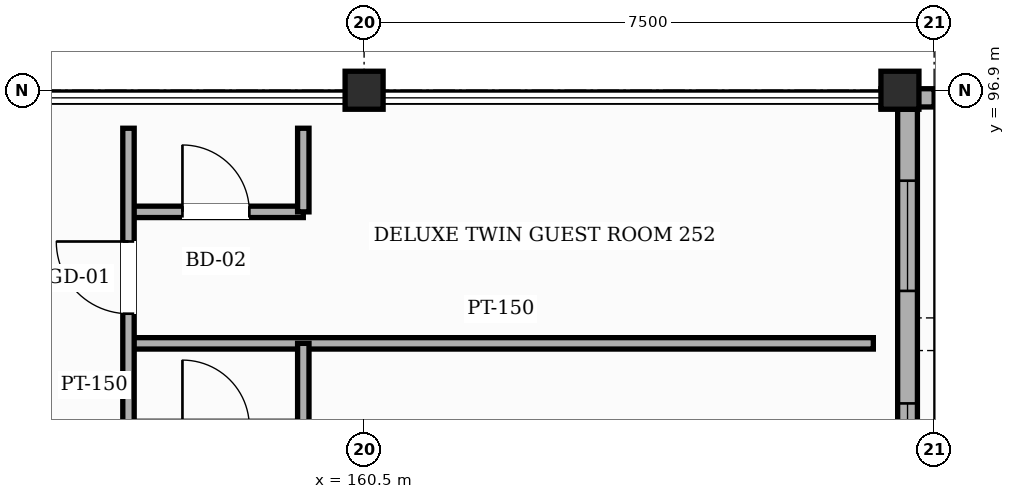
"""IFC4 building model, lengths in metres.
Left out: names, types, materials, properties, quantities, classifications, styles, units other than length and angle.
Written with IfcOpenShell. Run it as: python <this file> out.ifc"""

import sys

from ifc_helpers import new_model, si_unit, direction, frame, frame_2d, origin, origin_2d, place, context, subcontext, project, spatial, rectangle, hollow_rectangle, extrude, element, fill, save


model = new_model("IFC4")
c1 = context("Model", 3, precision=1e-05, world=origin(), true_north=direction((0.0, 1.0)))
c2 = subcontext(c1, "Body", "Model", "MODEL_VIEW")
j1 = project(units=[si_unit("LENGTHUNIT", "METRE"), si_unit("PLANEANGLEUNIT", "RADIAN")], contexts=[c1])
p1 = place(None, origin())
s1 = spatial("IfcSite", under=j1, at=p1, CompositionType="ELEMENT")
p2 = place(p1, origin())
s2 = spatial("IfcBuilding", under=s1, at=p2, CompositionType="ELEMENT")
p3 = place(p2, frame((0.0, 0.0, 35.4)))
s3 = spatial("IfcBuildingStorey", under=s2, at=p3, CompositionType="ELEMENT", Elevation=35.4)
for number, where, z_axis, x_axis in (
    (1, (160.5, 96.9, 0.0), (0.0, 0.0, 1.0), (1.0, 0.0, 0.0)),
    (2, (167.55, 96.9, 0.0), (0.0, 0.0, 1.0), (1.0, 0.0, 0.0)),
):
    element("IfcColumn", number, at=place(p3, frame(where, z_axis=z_axis, x_axis=x_axis)), inside=s3, PredefinedType="COLUMN", context=c2, shape_type="SweptSolid", body=[
        extrude(hollow_rectangle(XDim=0.5, YDim=0.5, WallThickness=0.022, InnerFilletRadius=0.022, OuterFilletRadius=0.044, at=origin_2d()), origin(), (0.0, 0.0, 1.0), 3.6),
    ])
p4 = place(p3, frame((167.65, 96.65, 0.0), z_axis=(0.0, 0.0, 1.0), x_axis=(0.0, -1.0, 0.0)))
e3 = element("IfcWall", 3, at=p4, inside=s3, PredefinedType="SOLIDWALL", context=c2, shape_type="SweptSolid", body=[
    extrude(rectangle(XDim=7.5, YDim=0.26, at=frame_2d((3.75, 0.0))), origin(), (0.0, 0.0, 1.0), 2.755),
])
p5 = place(p4, frame((6.28, 0.0, 0.85)))
e4 = element("IfcOpeningElement", 4, at=p5, cuts=e3, PredefinedType="OPENING", context=c2, shape_type="SweptSolid", body=[
    extrude(rectangle(XDim=0.85, YDim=1.35, at=frame_2d((0.425, 0.675))), frame((0.0, 0.14, 0.0), z_axis=(0.0, -1.0, 0.0), x_axis=(1.0, 0.0, 0.0)), (0.0, 0.0, 1.0), 0.28),
])
p6 = place(p4, frame((3.87, 0.0, 0.85)))
e5 = element("IfcOpeningElement", 5, at=p6, cuts=e3, PredefinedType="OPENING", context=c2, shape_type="SweptSolid", body=[
    extrude(rectangle(XDim=1.25, YDim=1.5, at=frame_2d((0.625, 0.75))), frame((0.0, 0.14, 0.0), z_axis=(0.0, -1.0, 0.0), x_axis=(1.0, 0.0, 0.0)), (0.0, 0.0, 1.0), 0.28),
])
p7 = place(p4, frame((0.94, 0.0, 0.85)))
e6 = element("IfcOpeningElement", 6, at=p7, cuts=e3, PredefinedType="OPENING", context=c2, shape_type="SweptSolid", body=[
    extrude(rectangle(XDim=1.45, YDim=1.5, at=frame_2d((0.725, 0.75))), frame((0.0, 0.14, 0.0), z_axis=(0.0, -1.0, 0.0), x_axis=(1.0, 0.0, 0.0)), (0.0, 0.0, 1.0), 0.28),
])
p8 = place(p3, frame((167.3, 96.8, 0.0), z_axis=(0.0, 0.0, 1.0), x_axis=(1.0, 0.0, 0.0)))
e7 = element("IfcWall", 7, at=p8, inside=s3, PredefinedType="SOLIDWALL", context=c2, shape_type="SweptSolid", body=[
    extrude(rectangle(XDim=0.7, YDim=0.24, at=frame_2d((0.35, 0.0))), origin(), (0.0, 0.0, 1.0), 3.365),
])
p9 = place(p3, frame((157.4, 93.57, 0.0), z_axis=(0.0, 0.0, 1.0), x_axis=(1.0, 0.0, 0.0)))
e8 = element("IfcWall", 8, at=p9, inside=s3, PredefinedType="PARTITIONING", context=c2, shape_type="SweptSolid", body=[
    extrude(rectangle(XDim=9.8, YDim=0.15, at=frame_2d((4.9, 0.0))), origin(), (0.0, 0.0, 1.0), 3.365),
])
p10 = place(p3, frame((157.4, 95.3, 0.0), z_axis=(0.0, 0.0, 1.0), x_axis=(1.0, 0.0, 0.0)))
e9 = element("IfcWall", 9, at=p10, inside=s3, PredefinedType="PARTITIONING", context=c2, shape_type="SweptSolid", body=[
    extrude(rectangle(XDim=2.3, YDim=0.15, at=frame_2d((1.15, 0.0))), origin(), (0.0, 0.0, 1.0), 3.365),
])
p11 = place(p10, frame((0.71, 0.0, 0.0)))
e10 = element("IfcOpeningElement", 10, at=p11, cuts=e9, PredefinedType="OPENING", context=c2, shape_type="SweptSolid", body=[
    extrude(rectangle(XDim=0.88, YDim=2.12, at=frame_2d((0.44, 1.06))), frame((0.0, 0.085, 0.0), z_axis=(0.0, -1.0, 0.0), x_axis=(1.0, 0.0, 0.0)), (0.0, 0.0, 1.0), 0.17),
])
p12 = place(p3, frame((157.4, 76.6, 0.0), z_axis=(0.0, 0.0, 1.0), x_axis=(0.0, 1.0, 0.0)))
e11 = element("IfcWall", 11, at=p12, inside=s3, PredefinedType="PARTITIONING", context=c2, shape_type="SweptSolid", body=[
    extrude(rectangle(XDim=19.8, YDim=0.15, at=frame_2d((9.9, 0.0))), origin(), (0.0, 0.0, 1.0), 3.365),
])
p13 = place(p12, frame((0.315, 0.0, 0.0)))
e12 = element("IfcOpeningElement", 12, at=p13, cuts=e11, PredefinedType="OPENING", context=c2, shape_type="SweptSolid", body=[
    extrude(rectangle(XDim=1.1, YDim=2.2, at=frame_2d((0.55, 1.1))), frame((0.0, 0.085, 0.0), z_axis=(0.0, -1.0, 0.0), x_axis=(1.0, 0.0, 0.0)), (0.0, 0.0, 1.0), 0.17),
])
p14 = place(p12, frame((3.22, 0.0, 0.0)))
e13 = element("IfcOpeningElement", 13, at=p14, cuts=e11, PredefinedType="OPENING", context=c2, shape_type="SweptSolid", body=[
    extrude(rectangle(XDim=0.95, YDim=2.15, at=frame_2d((0.475, 1.075))), frame((0.0, 0.085, 0.0), z_axis=(0.0, -1.0, 0.0), x_axis=(1.0, 0.0, 0.0)), (0.0, 0.0, 1.0), 0.17),
])
p15 = place(p12, frame((6.045, 0.0, 0.0)))
e14 = element("IfcOpeningElement", 14, at=p15, cuts=e11, PredefinedType="OPENING", context=c2, shape_type="SweptSolid", body=[
    extrude(rectangle(XDim=0.95, YDim=2.15, at=frame_2d((0.475, 1.075))), frame((0.0, 0.085, 0.0), z_axis=(0.0, -1.0, 0.0), x_axis=(1.0, 0.0, 0.0)), (0.0, 0.0, 1.0), 0.17),
])
p16 = place(p12, frame((8.875, 0.0, 0.0)))
e15 = element("IfcOpeningElement", 15, at=p16, cuts=e11, PredefinedType="OPENING", context=c2, shape_type="SweptSolid", body=[
    extrude(rectangle(XDim=0.95, YDim=2.15, at=frame_2d((0.475, 1.075))), frame((0.0, 0.085, 0.0), z_axis=(0.0, -1.0, 0.0), x_axis=(1.0, 0.0, 0.0)), (0.0, 0.0, 1.0), 0.17),
])
p17 = place(p12, frame((11.705, 0.0, 0.0)))
e16 = element("IfcOpeningElement", 16, at=p17, cuts=e11, PredefinedType="OPENING", context=c2, shape_type="SweptSolid", body=[
    extrude(rectangle(XDim=0.95, YDim=2.15, at=frame_2d((0.475, 1.075))), frame((0.0, 0.085, 0.0), z_axis=(0.0, -1.0, 0.0), x_axis=(1.0, 0.0, 0.0)), (0.0, 0.0, 1.0), 0.17),
])
p18 = place(p12, frame((14.53, 0.0, 0.0)))
e17 = element("IfcOpeningElement", 17, at=p18, cuts=e11, PredefinedType="OPENING", context=c2, shape_type="SweptSolid", body=[
    extrude(rectangle(XDim=0.95, YDim=2.15, at=frame_2d((0.475, 1.075))), frame((0.0, 0.085, 0.0), z_axis=(0.0, -1.0, 0.0), x_axis=(1.0, 0.0, 0.0)), (0.0, 0.0, 1.0), 0.17),
])
p19 = place(p12, frame((17.36, 0.0, 0.0)))
e18 = element("IfcOpeningElement", 18, at=p19, cuts=e11, PredefinedType="OPENING", context=c2, shape_type="SweptSolid", body=[
    extrude(rectangle(XDim=0.95, YDim=2.15, at=frame_2d((0.475, 1.075))), frame((0.0, 0.085, 0.0), z_axis=(0.0, -1.0, 0.0), x_axis=(1.0, 0.0, 0.0)), (0.0, 0.0, 1.0), 0.17),
])
p20 = place(p3, frame((159.7, 92.47, 0.0), z_axis=(0.0, 0.0, 1.0), x_axis=(0.0, 1.0, 0.0)))
e19 = element("IfcWall", 19, at=p20, inside=s3, PredefinedType="PARTITIONING", context=c2, shape_type="SweptSolid", body=[
    extrude(rectangle(XDim=1.1, YDim=0.15, at=frame_2d((0.55, 0.0))), origin(), (0.0, 0.0, 1.0), 3.365),
])
p21 = place(p3, frame((159.7, 95.3, 0.0), z_axis=(0.0, 0.0, 1.0), x_axis=(0.0, 1.0, 0.0)))
e20 = element("IfcWall", 20, at=p21, inside=s3, PredefinedType="PARTITIONING", context=c2, shape_type="SweptSolid", body=[
    extrude(rectangle(XDim=1.1, YDim=0.15, at=frame_2d((0.55, 0.0))), origin(), (0.0, 0.0, 1.0), 3.365),
])
p22 = place(p6, origin())
e21 = element("IfcWindow", 21, at=p22, inside=s3, PartitioningType="SINGLE_PANEL", PredefinedType="WINDOW", context=c2, shape_type="SweptSolid", body=[
    extrude(rectangle(XDim=1.25, YDim=1.5, at=frame_2d((0.625, 0.75))), frame((0.0, 0.03, 0.0), z_axis=(0.0, -1.0, 0.0), x_axis=(1.0, 0.0, 0.0)), (0.0, 0.0, 1.0), 0.06),
])
fill(e5, e21)
p23 = place(p7, origin())
e22 = element("IfcWindow", 22, at=p23, inside=s3, PartitioningType="SINGLE_PANEL", PredefinedType="WINDOW", context=c2, shape_type="SweptSolid", body=[
    extrude(rectangle(XDim=1.45, YDim=1.5, at=frame_2d((0.725, 0.75))), frame((0.0, 0.03, 0.0), z_axis=(0.0, -1.0, 0.0), x_axis=(1.0, 0.0, 0.0)), (0.0, 0.0, 1.0), 0.06),
])
fill(e6, e22)
p24 = place(p19, origin())
e23 = element("IfcDoor", 23, at=p24, inside=s3, OperationType="SINGLE_SWING_RIGHT", PredefinedType="DOOR", context=c2, shape_type="SweptSolid", body=[
    extrude(rectangle(XDim=0.95, YDim=2.15, at=frame_2d((0.475, 1.075))), frame((0.0, 0.025, 0.0), z_axis=(0.0, -1.0, 0.0), x_axis=(1.0, 0.0, 0.0)), (0.0, 0.0, 1.0), 0.05),
])
fill(e18, e23)
p25 = place(p11, origin())
e24 = element("IfcDoor", 24, at=p25, inside=s3, OperationType="SINGLE_SWING_LEFT", PredefinedType="DOOR", context=c2, shape_type="SweptSolid", body=[
    extrude(rectangle(XDim=0.88, YDim=2.12, at=frame_2d((0.44, 1.06))), frame((0.0, 0.025, 0.0), z_axis=(0.0, -1.0, 0.0), x_axis=(1.0, 0.0, 0.0)), (0.0, 0.0, 1.0), 0.05),
])
fill(e10, e24)
save(model, sys.argv[1])
